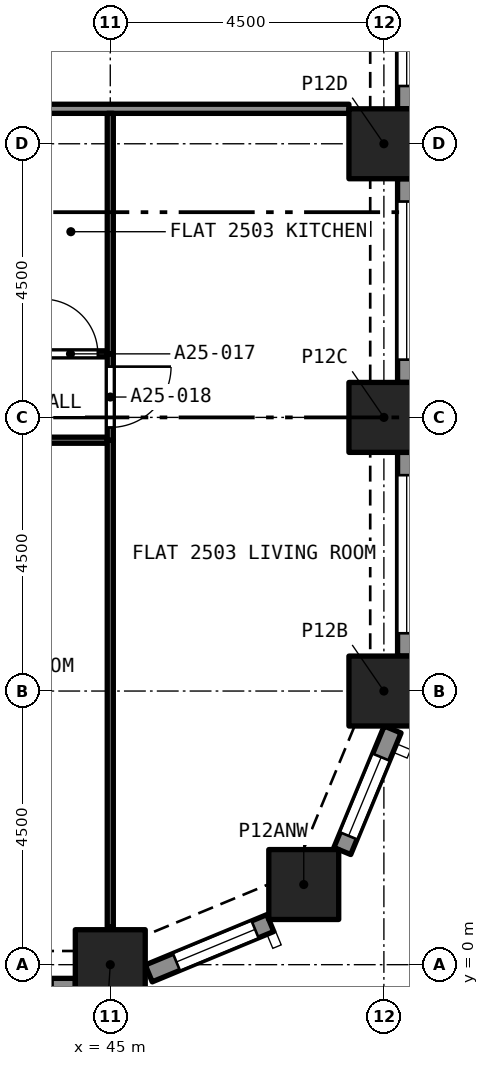
"""IFC4 building model, lengths in metres.
Left out: names, types, materials, properties, quantities, classifications, styles, units other than length and angle.
Written with IfcOpenShell. Run it as: python <this file> out.ifc"""

import sys

from ifc_helpers import new_model, si_unit, direction, frame, frame_2d, origin, origin_2d, place, context, subcontext, project, spatial, rectangle, extrude, element, fill, save


model = new_model("IFC4")
c1 = context("Model", 3, precision=1e-05, world=origin(), true_north=direction((0.0, 1.0)))
c2 = subcontext(c1, "Body", "Model", "MODEL_VIEW")
j1 = project(units=[si_unit("LENGTHUNIT", "METRE"), si_unit("PLANEANGLEUNIT", "RADIAN")], contexts=[c1])
p1 = place(None, origin())
s1 = spatial("IfcSite", under=j1, at=p1, CompositionType="ELEMENT")
p2 = place(p1, origin())
s2 = spatial("IfcBuilding", under=s1, at=p2, CompositionType="ELEMENT")
p3 = place(p2, frame((0.0, 0.0, 92.8)))
s3 = spatial("IfcBuildingStorey", under=s2, at=p3, CompositionType="ELEMENT", Elevation=92.8)
for number, where, z_axis, x_axis in (
    (1, (45.0, 0.0, 0.0), (0.0, 0.0, 1.0), (1.0, 0.0, 0.0)),
    (2, (48.182, 1.318, 0.0), (0.0, 0.0, 1.0), (1.0, 0.0, 0.0)),
    (3, (49.5, 4.5, 0.0), (0.0, 0.0, 1.0), (1.0, 0.0, 0.0)),
    (4, (49.5, 9.0, 0.0), (0.0, 0.0, 1.0), (1.0, 0.0, 0.0)),
    (5, (49.5, 13.5, 0.0), (0.0, 0.0, 1.0), (1.0, 0.0, 0.0)),
):
    element("IfcColumn", number, at=place(p3, frame(where, z_axis=z_axis, x_axis=x_axis)), inside=s3, PredefinedType="COLUMN", context=c2, shape_type="SweptSolid", body=[
        extrude(rectangle(XDim=1.15, YDim=1.15, at=origin_2d()), origin(), (0.0, 0.0, 1.0), 3.2),
    ])
p4 = place(p3, frame((44.425, -0.375, 0.0), z_axis=(0.0, 0.0, 1.0), x_axis=(-1.0, 0.0, 0.0)))
e6 = element("IfcWall", 6, at=p4, inside=s3, PredefinedType="SOLIDWALL", context=c2, shape_type="SweptSolid", body=[
    extrude(rectangle(XDim=3.35, YDim=0.3, at=frame_2d((1.675, 0.0))), origin(), (0.0, 0.0, 1.0), 3.2),
])
p5 = place(p4, frame((0.375, 0.0, 0.45)))
e7 = element("IfcOpeningElement", 7, at=p5, cuts=e6, PredefinedType="OPENING", context=c2, shape_type="SweptSolid", body=[
    extrude(rectangle(XDim=2.6, YDim=1.95, at=frame_2d((1.3, 0.975))), frame((0.0, 0.16, 0.0), z_axis=(0.0, -1.0, 0.0), x_axis=(1.0, 0.0, 0.0)), (0.0, 0.0, 1.0), 0.32),
])
p6 = place(p3, frame((47.631, 0.684, 0.0), z_axis=(0.0, 0.0, 1.0), x_axis=(-0.923862802911, -0.382723818695, 0.0)))
e8 = element("IfcWall", 8, at=p6, inside=s3, PredefinedType="SOLIDWALL", context=c2, shape_type="SweptSolid", body=[
    extrude(rectangle(XDim=2.164, YDim=0.3, at=frame_2d((1.082, 0.0))), origin(), (0.0, 0.0, 1.0), 3.2),
])
p7 = place(p6, frame((0.271, 0.0, 0.45)))
e9 = element("IfcOpeningElement", 9, at=p7, cuts=e8, PredefinedType="OPENING", context=c2, shape_type="SweptSolid", body=[
    extrude(rectangle(XDim=1.4, YDim=1.95, at=frame_2d((0.7, 0.975))), frame((0.0, 0.16, 0.0), z_axis=(0.0, -1.0, 0.0), x_axis=(1.0, 0.0, 0.0)), (0.0, 0.0, 1.0), 0.32),
])
p8 = place(p3, frame((49.644, 3.868, 0.0), z_axis=(0.0, 0.0, 1.0), x_axis=(-0.382723818695, -0.923862802911, 0.0)))
e10 = element("IfcWall", 10, at=p8, inside=s3, PredefinedType="SOLIDWALL", context=c2, shape_type="SweptSolid", body=[
    extrude(rectangle(XDim=2.164, YDim=0.3, at=frame_2d((1.082, 0.0))), origin(), (0.0, 0.0, 1.0), 3.2),
])
p9 = place(p8, frame((0.493, 0.0, 0.45)))
e11 = element("IfcOpeningElement", 11, at=p9, cuts=e10, PredefinedType="OPENING", context=c2, shape_type="SweptSolid", body=[
    extrude(rectangle(XDim=1.4, YDim=1.95, at=frame_2d((0.7, 0.975))), frame((0.0, 0.16, 0.0), z_axis=(0.0, -1.0, 0.0), x_axis=(1.0, 0.0, 0.0)), (0.0, 0.0, 1.0), 0.32),
])
p10 = place(p3, frame((49.875, 8.425, 0.0), z_axis=(0.0, 0.0, 1.0), x_axis=(0.0, -1.0, 0.0)))
e12 = element("IfcWall", 12, at=p10, inside=s3, PredefinedType="SOLIDWALL", context=c2, shape_type="SweptSolid", body=[
    extrude(rectangle(XDim=3.35, YDim=0.3, at=frame_2d((1.675, 0.0))), origin(), (0.0, 0.0, 1.0), 3.2),
])
p11 = place(p10, frame((0.375, 0.0, 0.45)))
e13 = element("IfcOpeningElement", 13, at=p11, cuts=e12, PredefinedType="OPENING", context=c2, shape_type="SweptSolid", body=[
    extrude(rectangle(XDim=2.6, YDim=1.95, at=frame_2d((1.3, 0.975))), frame((0.0, 0.16, 0.0), z_axis=(0.0, -1.0, 0.0), x_axis=(1.0, 0.0, 0.0)), (0.0, 0.0, 1.0), 0.32),
])
p12 = place(p3, frame((49.875, 12.925, 0.0), z_axis=(0.0, 0.0, 1.0), x_axis=(0.0, -1.0, 0.0)))
e14 = element("IfcWall", 14, at=p12, inside=s3, PredefinedType="SOLIDWALL", context=c2, shape_type="SweptSolid", body=[
    extrude(rectangle(XDim=3.35, YDim=0.3, at=frame_2d((1.675, 0.0))), origin(), (0.0, 0.0, 1.0), 3.2),
])
p13 = place(p12, frame((0.375, 0.0, 0.45)))
e15 = element("IfcOpeningElement", 15, at=p13, cuts=e14, PredefinedType="OPENING", context=c2, shape_type="SweptSolid", body=[
    extrude(rectangle(XDim=2.6, YDim=1.95, at=frame_2d((1.3, 0.975))), frame((0.0, 0.16, 0.0), z_axis=(0.0, -1.0, 0.0), x_axis=(1.0, 0.0, 0.0)), (0.0, 0.0, 1.0), 0.32),
])
p14 = place(p3, frame((49.875, 17.425, 0.0), z_axis=(0.0, 0.0, 1.0), x_axis=(0.0, -1.0, 0.0)))
e16 = element("IfcWall", 16, at=p14, inside=s3, PredefinedType="SOLIDWALL", context=c2, shape_type="SweptSolid", body=[
    extrude(rectangle(XDim=3.35, YDim=0.3, at=frame_2d((1.675, 0.0))), origin(), (0.0, 0.0, 1.0), 3.2),
])
p15 = place(p14, frame((0.375, 0.0, 0.45)))
e17 = element("IfcOpeningElement", 17, at=p15, cuts=e16, PredefinedType="OPENING", context=c2, shape_type="SweptSolid", body=[
    extrude(rectangle(XDim=2.6, YDim=1.95, at=frame_2d((1.3, 0.975))), frame((0.0, 0.16, 0.0), z_axis=(0.0, -1.0, 0.0), x_axis=(1.0, 0.0, 0.0)), (0.0, 0.0, 1.0), 0.32),
])
p16 = place(p3, frame((42.6, 14.075, 0.0), z_axis=(0.0, 0.0, 1.0), x_axis=(1.0, 0.0, 0.0)))
e18 = element("IfcWall", 18, at=p16, inside=s3, PredefinedType="PARTITIONING", context=c2, shape_type="SweptSolid", body=[
    extrude(rectangle(XDim=6.325, YDim=0.15, at=frame_2d((3.163, 0.0))), origin(), (0.0, 0.0, 1.0), 2.9),
])
p17 = place(p3, frame((44.95, 8.625, 0.0), z_axis=(0.0, 0.0, 1.0), x_axis=(-1.0, 0.0, 0.0)))
e19 = element("IfcWall", 19, at=p17, inside=s3, PredefinedType="PARTITIONING", context=c2, shape_type="SweptSolid", body=[
    extrude(rectangle(XDim=4.35, YDim=0.1, at=frame_2d((2.175, 0.0))), origin(), (0.0, 0.0, 1.0), 2.9),
])
p18 = place(p17, frame((1.75, 0.0, 0.0)))
e20 = element("IfcOpeningElement", 20, at=p18, cuts=e19, PredefinedType="OPENING", context=c2, shape_type="SweptSolid", body=[
    extrude(rectangle(XDim=0.9, YDim=2.1, at=frame_2d((0.45, 1.05))), frame((0.0, 0.06, 0.0), z_axis=(0.0, -1.0, 0.0), x_axis=(1.0, 0.0, 0.0)), (0.0, 0.0, 1.0), 0.12),
])
p19 = place(p3, frame((45.0, 0.622, 0.0), z_axis=(0.0, 0.0, 1.0), x_axis=(0.0, 1.0, 0.0)))
e21 = element("IfcWall", 21, at=p19, inside=s3, PredefinedType="PARTITIONING", context=c2, shape_type="SweptSolid", body=[
    extrude(rectangle(XDim=8.003, YDim=0.1, at=frame_2d((4.001, 0.0))), origin(), (0.0, 0.0, 1.0), 2.9),
])
p20 = place(p3, frame((43.691, 10.045, 0.0), z_axis=(0.0, 0.0, 1.0), x_axis=(1.0, 0.0, 0.0)))
e22 = element("IfcWall", 22, at=p20, inside=s3, PredefinedType="PARTITIONING", context=c2, shape_type="SweptSolid", body=[
    extrude(rectangle(XDim=1.259, YDim=0.1, at=frame_2d((0.629, 0.0))), origin(), (0.0, 0.0, 1.0), 2.9),
])
p21 = place(p20, frame((0.205, 0.0, 0.0)))
e23 = element("IfcOpeningElement", 23, at=p21, cuts=e22, PredefinedType="OPENING", context=c2, shape_type="SweptSolid", body=[
    extrude(rectangle(XDim=0.9, YDim=2.1, at=frame_2d((0.45, 1.05))), frame((0.0, 0.06, 0.0), z_axis=(0.0, -1.0, 0.0), x_axis=(1.0, 0.0, 0.0)), (0.0, 0.0, 1.0), 0.12),
])
p22 = place(p3, frame((45.0, 10.045, 0.0), z_axis=(0.0, 0.0, 1.0), x_axis=(0.0, -1.0, 0.0)))
e24 = element("IfcWall", 24, at=p22, inside=s3, PredefinedType="PARTITIONING", context=c2, shape_type="SweptSolid", body=[
    extrude(rectangle(XDim=1.42, YDim=0.1, at=frame_2d((0.71, 0.0))), origin(), (0.0, 0.0, 1.0), 2.9),
])
p23 = place(p22, frame((0.21, 0.0, 0.0)))
e25 = element("IfcOpeningElement", 25, at=p23, cuts=e24, PredefinedType="OPENING", context=c2, shape_type="SweptSolid", body=[
    extrude(rectangle(XDim=1.0, YDim=2.1, at=frame_2d((0.5, 1.05))), frame((0.0, 0.06, 0.0), z_axis=(0.0, -1.0, 0.0), x_axis=(1.0, 0.0, 0.0)), (0.0, 0.0, 1.0), 0.12),
])
p24 = place(p3, frame((45.0, 10.045, 0.0), z_axis=(0.0, 0.0, 1.0), x_axis=(0.0, 1.0, 0.0)))
e26 = element("IfcWall", 26, at=p24, inside=s3, PredefinedType="PARTITIONING", context=c2, shape_type="SweptSolid", body=[
    extrude(rectangle(XDim=3.955, YDim=0.1, at=frame_2d((1.978, 0.0))), origin(), (0.0, 0.0, 1.0), 2.9),
])
p25 = place(p7, origin())
e27 = element("IfcWindow", 27, at=p25, inside=s3, PartitioningType="SINGLE_PANEL", PredefinedType="WINDOW", context=c2, shape_type="SweptSolid", body=[
    extrude(rectangle(XDim=1.4, YDim=1.95, at=frame_2d((0.7, 0.975))), frame((0.0, 0.03, 0.0), z_axis=(0.0, -1.0, 0.0), x_axis=(1.0, 0.0, 0.0)), (0.0, 0.0, 1.0), 0.06),
])
fill(e9, e27)
p26 = place(p9, origin())
e28 = element("IfcWindow", 28, at=p26, inside=s3, PartitioningType="SINGLE_PANEL", PredefinedType="WINDOW", context=c2, shape_type="SweptSolid", body=[
    extrude(rectangle(XDim=1.4, YDim=1.95, at=frame_2d((0.7, 0.975))), frame((0.0, 0.03, 0.0), z_axis=(0.0, -1.0, 0.0), x_axis=(1.0, 0.0, 0.0)), (0.0, 0.0, 1.0), 0.06),
])
fill(e11, e28)
p27 = place(p11, origin())
e29 = element("IfcWindow", 29, at=p27, inside=s3, PartitioningType="SINGLE_PANEL", PredefinedType="WINDOW", context=c2, shape_type="SweptSolid", body=[
    extrude(rectangle(XDim=2.6, YDim=1.95, at=frame_2d((1.3, 0.975))), frame((0.0, 0.03, 0.0), z_axis=(0.0, -1.0, 0.0), x_axis=(1.0, 0.0, 0.0)), (0.0, 0.0, 1.0), 0.06),
])
fill(e13, e29)
p28 = place(p13, origin())
e30 = element("IfcWindow", 30, at=p28, inside=s3, PartitioningType="SINGLE_PANEL", PredefinedType="WINDOW", context=c2, shape_type="SweptSolid", body=[
    extrude(rectangle(XDim=2.6, YDim=1.95, at=frame_2d((1.3, 0.975))), frame((0.0, 0.03, 0.0), z_axis=(0.0, -1.0, 0.0), x_axis=(1.0, 0.0, 0.0)), (0.0, 0.0, 1.0), 0.06),
])
fill(e15, e30)
p29 = place(p15, origin())
e31 = element("IfcWindow", 31, at=p29, inside=s3, PartitioningType="SINGLE_PANEL", PredefinedType="WINDOW", context=c2, shape_type="SweptSolid", body=[
    extrude(rectangle(XDim=2.6, YDim=1.95, at=frame_2d((1.3, 0.975))), frame((0.0, 0.03, 0.0), z_axis=(0.0, -1.0, 0.0), x_axis=(1.0, 0.0, 0.0)), (0.0, 0.0, 1.0), 0.06),
])
fill(e17, e31)
p30 = place(p21, origin())
e32 = element("IfcDoor", 32, at=p30, inside=s3, OperationType="SINGLE_SWING_RIGHT", PredefinedType="DOOR", context=c2, shape_type="SweptSolid", body=[
    extrude(rectangle(XDim=0.9, YDim=2.1, at=frame_2d((0.45, 1.05))), frame((0.0, 0.025, 0.0), z_axis=(0.0, -1.0, 0.0), x_axis=(1.0, 0.0, 0.0)), (0.0, 0.0, 1.0), 0.05),
])
fill(e23, e32)
p31 = place(p23, origin())
e33 = element("IfcDoor", 33, at=p31, inside=s3, OperationType="SINGLE_SWING_LEFT", PredefinedType="DOOR", context=c2, shape_type="SweptSolid", body=[
    extrude(rectangle(XDim=1.0, YDim=2.1, at=frame_2d((0.5, 1.05))), frame((0.0, 0.025, 0.0), z_axis=(0.0, -1.0, 0.0), x_axis=(1.0, 0.0, 0.0)), (0.0, 0.0, 1.0), 0.05),
])
fill(e25, e33)
save(model, sys.argv[1])
